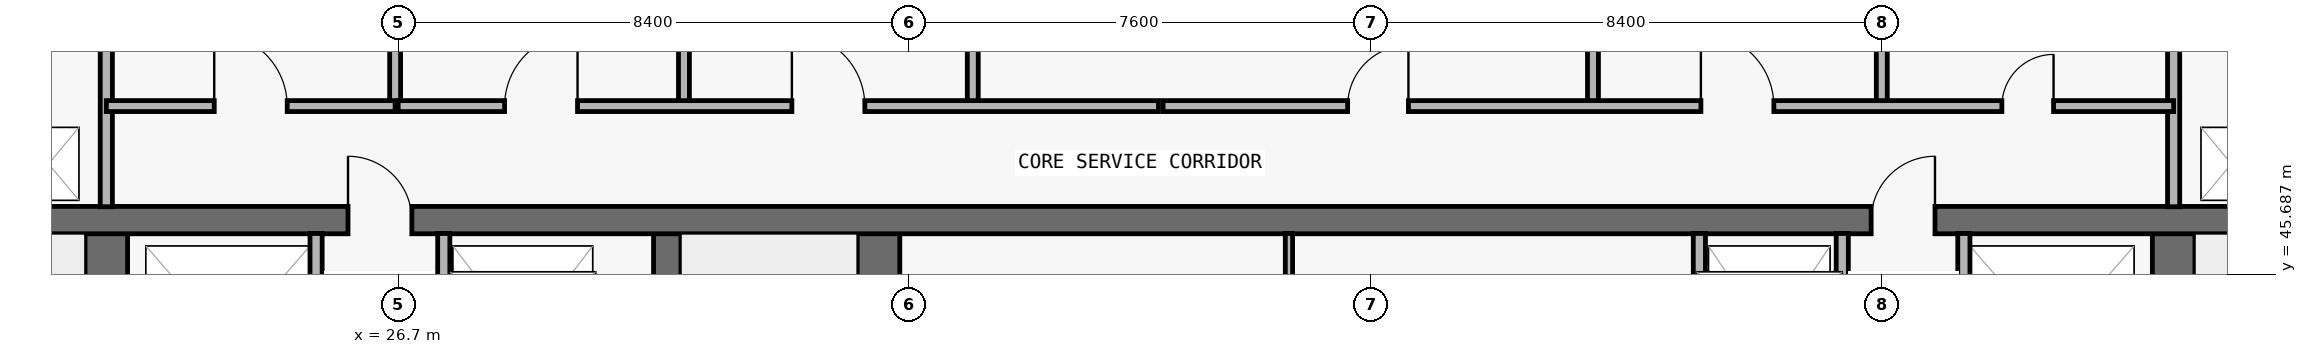
"""IFC4 building model, lengths in metres.
Left out: names, types, materials, properties, quantities, classifications, styles, units other than length and angle.
Written with IfcOpenShell. Run it as: python <this file> out.ifc"""

import sys

from ifc_helpers import new_model, si_unit, direction, frame, frame_2d, origin, place, context, subcontext, project, spatial, rectangle, extrude, element, fill, save


model = new_model("IFC4")
c1 = context("Model", 3, precision=1e-05, world=origin(), true_north=direction((0.0, 1.0)))
c2 = subcontext(c1, "Body", "Model", "MODEL_VIEW")
j1 = project(units=[si_unit("LENGTHUNIT", "METRE"), si_unit("PLANEANGLEUNIT", "RADIAN")], contexts=[c1])
p1 = place(None, origin())
s1 = spatial("IfcSite", under=j1, at=p1, CompositionType="ELEMENT")
p2 = place(p1, origin())
s2 = spatial("IfcBuilding", under=s1, at=p2, CompositionType="ELEMENT")
p3 = place(p2, frame((0.0, 0.0, 229.8)))
s3 = spatial("IfcBuildingStorey", under=s2, at=p3, CompositionType="ELEMENT", Elevation=229.8)
p4 = place(p3, frame((21.9, 37.0, 0.0), z_axis=(0.0, 0.0, 1.0), x_axis=(0.0, 1.0, 0.0)))
e1 = element("IfcWall", 1, at=p4, inside=s3, PredefinedType="SHEAR", context=c2, shape_type="SweptSolid", body=[
    extrude(rectangle(XDim=9.575, YDim=0.7, at=frame_2d((4.788, 0.0))), origin(), (0.0, 0.0, 1.0), 3.05),
])
p5 = place(p4, frame((0.55, 0.0, 0.0)))
e2 = element("IfcOpeningElement", 2, at=p5, cuts=e1, PredefinedType="OPENING", context=c2, shape_type="SweptSolid", body=[
    extrude(rectangle(XDim=1.1, YDim=2.15, at=frame_2d((0.55, 1.075))), frame((0.0, 0.36, 0.0), z_axis=(0.0, -1.0, 0.0), x_axis=(1.0, 0.0, 0.0)), (0.0, 0.0, 1.0), 0.72),
])
p6 = place(p3, frame((55.9, 37.0, 0.0), z_axis=(0.0, 0.0, 1.0), x_axis=(0.0, 1.0, 0.0)))
e3 = element("IfcWall", 3, at=p6, inside=s3, PredefinedType="SHEAR", context=c2, shape_type="SweptSolid", body=[
    extrude(rectangle(XDim=9.575, YDim=0.7, at=frame_2d((4.788, 0.0))), origin(), (0.0, 0.0, 1.0), 3.05),
])
p7 = place(p6, frame((0.55, 0.0, 0.0)))
e4 = element("IfcOpeningElement", 4, at=p7, cuts=e3, PredefinedType="OPENING", context=c2, shape_type="SweptSolid", body=[
    extrude(rectangle(XDim=1.1, YDim=2.15, at=frame_2d((0.55, 1.075))), frame((0.0, 0.36, 0.0), z_axis=(0.0, -1.0, 0.0), x_axis=(1.0, 0.0, 0.0)), (0.0, 0.0, 1.0), 0.72),
])
p8 = place(p3, frame((31.125, 37.0, 0.0), z_axis=(0.0, 0.0, 1.0), x_axis=(0.0, 1.0, 0.0)))
e5 = element("IfcWall", 5, at=p8, inside=s3, PredefinedType="SHEAR", context=c2, shape_type="SweptSolid", body=[
    extrude(rectangle(XDim=9.575, YDim=0.45, at=frame_2d((4.788, 0.0))), origin(), (0.0, 0.0, 1.0), 3.05),
])
p9 = place(p3, frame((34.6, 37.0, 0.0), z_axis=(0.0, 0.0, 1.0), x_axis=(0.0, 1.0, 0.0)))
e6 = element("IfcWall", 6, at=p9, inside=s3, PredefinedType="SHEAR", context=c2, shape_type="SweptSolid", body=[
    extrude(rectangle(XDim=9.575, YDim=0.7, at=frame_2d((4.788, 0.0))), origin(), (0.0, 0.0, 1.0), 3.05),
])
p10 = place(p3, frame((18.3, 46.575, 0.0), z_axis=(0.0, 0.0, 1.0), x_axis=(1.0, 0.0, 0.0)))
e7 = element("IfcWall", 7, at=p10, inside=s3, PredefinedType="SHEAR", context=c2, shape_type="SweptSolid", body=[
    extrude(rectangle(XDim=41.2, YDim=0.45, at=frame_2d((20.6, 0.0))), origin(), (0.0, 0.0, 1.0), 3.05),
])
p11 = place(p10, frame((7.575, 0.0, 0.0)))
e8 = element("IfcOpeningElement", 8, at=p11, cuts=e7, PredefinedType="OPENING", context=c2, shape_type="SweptSolid", body=[
    extrude(rectangle(XDim=1.05, YDim=2.15, at=frame_2d((0.525, 1.075))), frame((0.0, 0.235, 0.0), z_axis=(0.0, -1.0, 0.0), x_axis=(1.0, 0.0, 0.0)), (0.0, 0.0, 1.0), 0.47),
])
p12 = place(p10, frame((32.625, 0.0, 0.0)))
e9 = element("IfcOpeningElement", 9, at=p12, cuts=e7, PredefinedType="OPENING", context=c2, shape_type="SweptSolid", body=[
    extrude(rectangle(XDim=1.05, YDim=2.15, at=frame_2d((0.525, 1.075))), frame((0.0, 0.235, 0.0), z_axis=(0.0, -1.0, 0.0), x_axis=(1.0, 0.0, 0.0)), (0.0, 0.0, 1.0), 0.47),
])
p13 = place(p3, frame((21.9, 46.795, 0.0), z_axis=(0.0, 0.0, 1.0), x_axis=(0.0, 1.0, 0.0)))
e10 = element("IfcWall", 10, at=p13, inside=s3, PredefinedType="PARTITIONING", context=c2, shape_type="SweptSolid", body=[
    extrude(rectangle(XDim=3.16, YDim=0.2, at=frame_2d((1.58, 0.0))), origin(), (0.0, 0.0, 1.0), 3.05),
])
p14 = place(p3, frame((25.35, 43.17, 0.0), z_axis=(0.0, 0.0, 1.0), x_axis=(0.0, 1.0, 0.0)))
e11 = element("IfcWall", 11, at=p14, inside=s3, PredefinedType="PARTITIONING", context=c2, shape_type="SweptSolid", body=[
    extrude(rectangle(XDim=3.185, YDim=0.2, at=frame_2d((1.593, 0.0))), origin(), (0.0, 0.0, 1.0), 3.05),
])
p15 = place(p3, frame((26.65, 48.45, 0.0), z_axis=(0.0, 0.0, 1.0), x_axis=(0.0, 1.0, 0.0)))
e12 = element("IfcWall", 12, at=p15, inside=s3, PredefinedType="PARTITIONING", context=c2, shape_type="SweptSolid", body=[
    extrude(rectangle(XDim=1.505, YDim=0.18, at=frame_2d((0.752, 0.0))), origin(), (0.0, 0.0, 1.0), 3.05),
])
p16 = place(p3, frame((27.45, 43.17, 0.0), z_axis=(0.0, 0.0, 1.0), x_axis=(0.0, 1.0, 0.0)))
e13 = element("IfcWall", 13, at=p16, inside=s3, PredefinedType="PARTITIONING", context=c2, shape_type="SweptSolid", body=[
    extrude(rectangle(XDim=3.185, YDim=0.2, at=frame_2d((1.593, 0.0))), origin(), (0.0, 0.0, 1.0), 3.05),
])
for number, where, z_axis, x_axis in (
    (14, (31.4, 48.45, 0.0), (0.0, 0.0, 1.0), (0.0, 1.0, 0.0)),
    (15, (36.15, 48.45, 0.0), (0.0, 0.0, 1.0), (0.0, 1.0, 0.0)),
):
    element("IfcWall", number, at=place(p3, frame(where, z_axis=z_axis, x_axis=x_axis)), inside=s3, PredefinedType="PARTITIONING", context=c2, shape_type="SweptSolid", body=[
        extrude(rectangle(XDim=1.505, YDim=0.18, at=frame_2d((0.752, 0.0))), origin(), (0.0, 0.0, 1.0), 3.05),
    ])
p17 = place(p3, frame((41.35, 43.17, 0.0), z_axis=(0.0, 0.0, 1.0), x_axis=(0.0, 1.0, 0.0)))
e16 = element("IfcWall", 16, at=p17, inside=s3, PredefinedType="PARTITIONING", context=c2, shape_type="SweptSolid", body=[
    extrude(rectangle(XDim=3.185, YDim=0.12, at=frame_2d((1.593, 0.0))), origin(), (0.0, 0.0, 1.0), 3.05),
])
p18 = place(p3, frame((46.35, 48.45, 0.0), z_axis=(0.0, 0.0, 1.0), x_axis=(0.0, 1.0, 0.0)))
e17 = element("IfcWall", 17, at=p18, inside=s3, PredefinedType="PARTITIONING", context=c2, shape_type="SweptSolid", body=[
    extrude(rectangle(XDim=1.505, YDim=0.18, at=frame_2d((0.752, 0.0))), origin(), (0.0, 0.0, 1.0), 3.05),
])
for number, where, z_axis, x_axis in (
    (18, (48.1, 43.17, 0.0), (0.0, 0.0, 1.0), (0.0, 1.0, 0.0)),
    (19, (50.45, 43.17, 0.0), (0.0, 0.0, 1.0), (0.0, 1.0, 0.0)),
):
    element("IfcWall", number, at=place(p3, frame(where, z_axis=z_axis, x_axis=x_axis)), inside=s3, PredefinedType="PARTITIONING", context=c2, shape_type="SweptSolid", body=[
        extrude(rectangle(XDim=3.185, YDim=0.2, at=frame_2d((1.593, 0.0))), origin(), (0.0, 0.0, 1.0), 3.05),
    ])
p19 = place(p3, frame((51.1, 48.45, 0.0), z_axis=(0.0, 0.0, 1.0), x_axis=(0.0, 1.0, 0.0)))
e20 = element("IfcWall", 20, at=p19, inside=s3, PredefinedType="PARTITIONING", context=c2, shape_type="SweptSolid", body=[
    extrude(rectangle(XDim=1.505, YDim=0.18, at=frame_2d((0.752, 0.0))), origin(), (0.0, 0.0, 1.0), 3.05),
])
p20 = place(p3, frame((52.45, 43.17, 0.0), z_axis=(0.0, 0.0, 1.0), x_axis=(0.0, 1.0, 0.0)))
e21 = element("IfcWall", 21, at=p20, inside=s3, PredefinedType="PARTITIONING", context=c2, shape_type="SweptSolid", body=[
    extrude(rectangle(XDim=3.185, YDim=0.2, at=frame_2d((1.593, 0.0))), origin(), (0.0, 0.0, 1.0), 3.05),
])
p21 = place(p3, frame((55.9, 46.795, 0.0), z_axis=(0.0, 0.0, 1.0), x_axis=(0.0, 1.0, 0.0)))
e22 = element("IfcWall", 22, at=p21, inside=s3, PredefinedType="PARTITIONING", context=c2, shape_type="SweptSolid", body=[
    extrude(rectangle(XDim=3.16, YDim=0.2, at=frame_2d((1.58, 0.0))), origin(), (0.0, 0.0, 1.0), 3.05),
])
p22 = place(p3, frame((21.9, 48.45, 0.0), z_axis=(0.0, 0.0, 1.0), x_axis=(1.0, 0.0, 0.0)))
e23 = element("IfcWall", 23, at=p22, inside=s3, PredefinedType="PARTITIONING", context=c2, shape_type="SweptSolid", body=[
    extrude(rectangle(XDim=4.75, YDim=0.18, at=frame_2d((2.375, 0.0))), origin(), (0.0, 0.0, 1.0), 3.05),
])
p23 = place(p22, frame((1.775, 0.0, 0.0)))
e24 = element("IfcOpeningElement", 24, at=p23, cuts=e23, PredefinedType="OPENING", context=c2, shape_type="SweptSolid", body=[
    extrude(rectangle(XDim=1.2, YDim=2.2, at=frame_2d((0.6, 1.1))), frame((0.0, 0.1, 0.0), z_axis=(0.0, -1.0, 0.0), x_axis=(1.0, 0.0, 0.0)), (0.0, 0.0, 1.0), 0.2),
])
p24 = place(p3, frame((26.7, 48.45, 0.0), z_axis=(0.0, 0.0, 1.0), x_axis=(1.0, 0.0, 0.0)))
e25 = element("IfcWall", 25, at=p24, inside=s3, PredefinedType="PARTITIONING", context=c2, shape_type="SweptSolid", body=[
    extrude(rectangle(XDim=12.504, YDim=0.18, at=frame_2d((6.252, 0.0))), origin(), (0.0, 0.0, 1.0), 3.05),
])
p25 = place(p24, frame((1.75, 0.0, 0.0)))
e26 = element("IfcOpeningElement", 26, at=p25, cuts=e25, PredefinedType="OPENING", context=c2, shape_type="SweptSolid", body=[
    extrude(rectangle(XDim=1.2, YDim=2.2, at=frame_2d((0.6, 1.1))), frame((0.0, 0.1, 0.0), z_axis=(0.0, -1.0, 0.0), x_axis=(1.0, 0.0, 0.0)), (0.0, 0.0, 1.0), 0.2),
])
p26 = place(p24, frame((6.475, 0.0, 0.0)))
e27 = element("IfcOpeningElement", 27, at=p26, cuts=e25, PredefinedType="OPENING", context=c2, shape_type="SweptSolid", body=[
    extrude(rectangle(XDim=1.2, YDim=2.2, at=frame_2d((0.6, 1.1))), frame((0.0, 0.1, 0.0), z_axis=(0.0, -1.0, 0.0), x_axis=(1.0, 0.0, 0.0)), (0.0, 0.0, 1.0), 0.2),
])
p27 = place(p3, frame((39.28, 48.45, 0.0), z_axis=(0.0, 0.0, 1.0), x_axis=(1.0, 0.0, 0.0)))
e28 = element("IfcWall", 28, at=p27, inside=s3, PredefinedType="PARTITIONING", context=c2, shape_type="SweptSolid", body=[
    extrude(rectangle(XDim=16.62, YDim=0.18, at=frame_2d((8.31, 0.0))), origin(), (0.0, 0.0, 1.0), 3.05),
])
p28 = place(p27, frame((3.035, 0.0, 0.0)))
e29 = element("IfcOpeningElement", 29, at=p28, cuts=e28, PredefinedType="OPENING", context=c2, shape_type="SweptSolid", body=[
    extrude(rectangle(XDim=1.0, YDim=2.2, at=frame_2d((0.5, 1.1))), frame((0.0, 0.1, 0.0), z_axis=(0.0, -1.0, 0.0), x_axis=(1.0, 0.0, 0.0)), (0.0, 0.0, 1.0), 0.2),
])
p29 = place(p27, frame((8.845, 0.0, 0.0)))
e30 = element("IfcOpeningElement", 30, at=p29, cuts=e28, PredefinedType="OPENING", context=c2, shape_type="SweptSolid", body=[
    extrude(rectangle(XDim=1.2, YDim=2.2, at=frame_2d((0.6, 1.1))), frame((0.0, 0.1, 0.0), z_axis=(0.0, -1.0, 0.0), x_axis=(1.0, 0.0, 0.0)), (0.0, 0.0, 1.0), 0.2),
])
p30 = place(p27, frame((13.795, 0.0, 0.0)))
e31 = element("IfcOpeningElement", 31, at=p30, cuts=e28, PredefinedType="OPENING", context=c2, shape_type="SweptSolid", body=[
    extrude(rectangle(XDim=0.85, YDim=2.1, at=frame_2d((0.425, 1.05))), frame((0.0, 0.1, 0.0), z_axis=(0.0, -1.0, 0.0), x_axis=(1.0, 0.0, 0.0)), (0.0, 0.0, 1.0), 0.2),
])
p31 = place(p11, origin())
e32 = element("IfcDoor", 32, at=p31, inside=s3, OperationType="SINGLE_SWING_LEFT", PredefinedType="DOOR", context=c2, shape_type="SweptSolid", body=[
    extrude(rectangle(XDim=1.05, YDim=2.15, at=frame_2d((0.525, 1.075))), frame((0.0, 0.025, 0.0), z_axis=(0.0, -1.0, 0.0), x_axis=(1.0, 0.0, 0.0)), (0.0, 0.0, 1.0), 0.05),
])
fill(e8, e32)
p32 = place(p12, origin())
e33 = element("IfcDoor", 33, at=p32, inside=s3, OperationType="SINGLE_SWING_RIGHT", PredefinedType="DOOR", context=c2, shape_type="SweptSolid", body=[
    extrude(rectangle(XDim=1.05, YDim=2.15, at=frame_2d((0.525, 1.075))), frame((0.0, 0.025, 0.0), z_axis=(0.0, -1.0, 0.0), x_axis=(1.0, 0.0, 0.0)), (0.0, 0.0, 1.0), 0.05),
])
fill(e9, e33)
p33 = place(p23, origin())
e34 = element("IfcDoor", 34, at=p33, inside=s3, OperationType="SINGLE_SWING_LEFT", PredefinedType="DOOR", context=c2, shape_type="SweptSolid", body=[
    extrude(rectangle(XDim=1.2, YDim=2.2, at=frame_2d((0.6, 1.1))), frame((0.0, 0.025, 0.0), z_axis=(0.0, -1.0, 0.0), x_axis=(1.0, 0.0, 0.0)), (0.0, 0.0, 1.0), 0.05),
])
fill(e24, e34)
p34 = place(p25, origin())
e35 = element("IfcDoor", 35, at=p34, inside=s3, OperationType="SINGLE_SWING_RIGHT", PredefinedType="DOOR", context=c2, shape_type="SweptSolid", body=[
    extrude(rectangle(XDim=1.2, YDim=2.2, at=frame_2d((0.6, 1.1))), frame((0.0, 0.025, 0.0), z_axis=(0.0, -1.0, 0.0), x_axis=(1.0, 0.0, 0.0)), (0.0, 0.0, 1.0), 0.05),
])
fill(e26, e35)
p35 = place(p26, origin())
e36 = element("IfcDoor", 36, at=p35, inside=s3, OperationType="SINGLE_SWING_LEFT", PredefinedType="DOOR", context=c2, shape_type="SweptSolid", body=[
    extrude(rectangle(XDim=1.2, YDim=2.2, at=frame_2d((0.6, 1.1))), frame((0.0, 0.025, 0.0), z_axis=(0.0, -1.0, 0.0), x_axis=(1.0, 0.0, 0.0)), (0.0, 0.0, 1.0), 0.05),
])
fill(e27, e36)
p36 = place(p28, origin())
e37 = element("IfcDoor", 37, at=p36, inside=s3, OperationType="SINGLE_SWING_RIGHT", PredefinedType="DOOR", context=c2, shape_type="SweptSolid", body=[
    extrude(rectangle(XDim=1.0, YDim=2.2, at=frame_2d((0.5, 1.1))), frame((0.0, 0.025, 0.0), z_axis=(0.0, -1.0, 0.0), x_axis=(1.0, 0.0, 0.0)), (0.0, 0.0, 1.0), 0.05),
])
fill(e29, e37)
p37 = place(p29, origin())
e38 = element("IfcDoor", 38, at=p37, inside=s3, OperationType="SINGLE_SWING_LEFT", PredefinedType="DOOR", context=c2, shape_type="SweptSolid", body=[
    extrude(rectangle(XDim=1.2, YDim=2.2, at=frame_2d((0.6, 1.1))), frame((0.0, 0.025, 0.0), z_axis=(0.0, -1.0, 0.0), x_axis=(1.0, 0.0, 0.0)), (0.0, 0.0, 1.0), 0.05),
])
fill(e30, e38)
p38 = place(p30, origin())
e39 = element("IfcDoor", 39, at=p38, inside=s3, OperationType="SINGLE_SWING_RIGHT", PredefinedType="DOOR", context=c2, shape_type="SweptSolid", body=[
    extrude(rectangle(XDim=0.85, YDim=2.1, at=frame_2d((0.425, 1.05))), frame((0.0, 0.025, 0.0), z_axis=(0.0, -1.0, 0.0), x_axis=(1.0, 0.0, 0.0)), (0.0, 0.0, 1.0), 0.05),
])
fill(e31, e39)
save(model, sys.argv[1])
